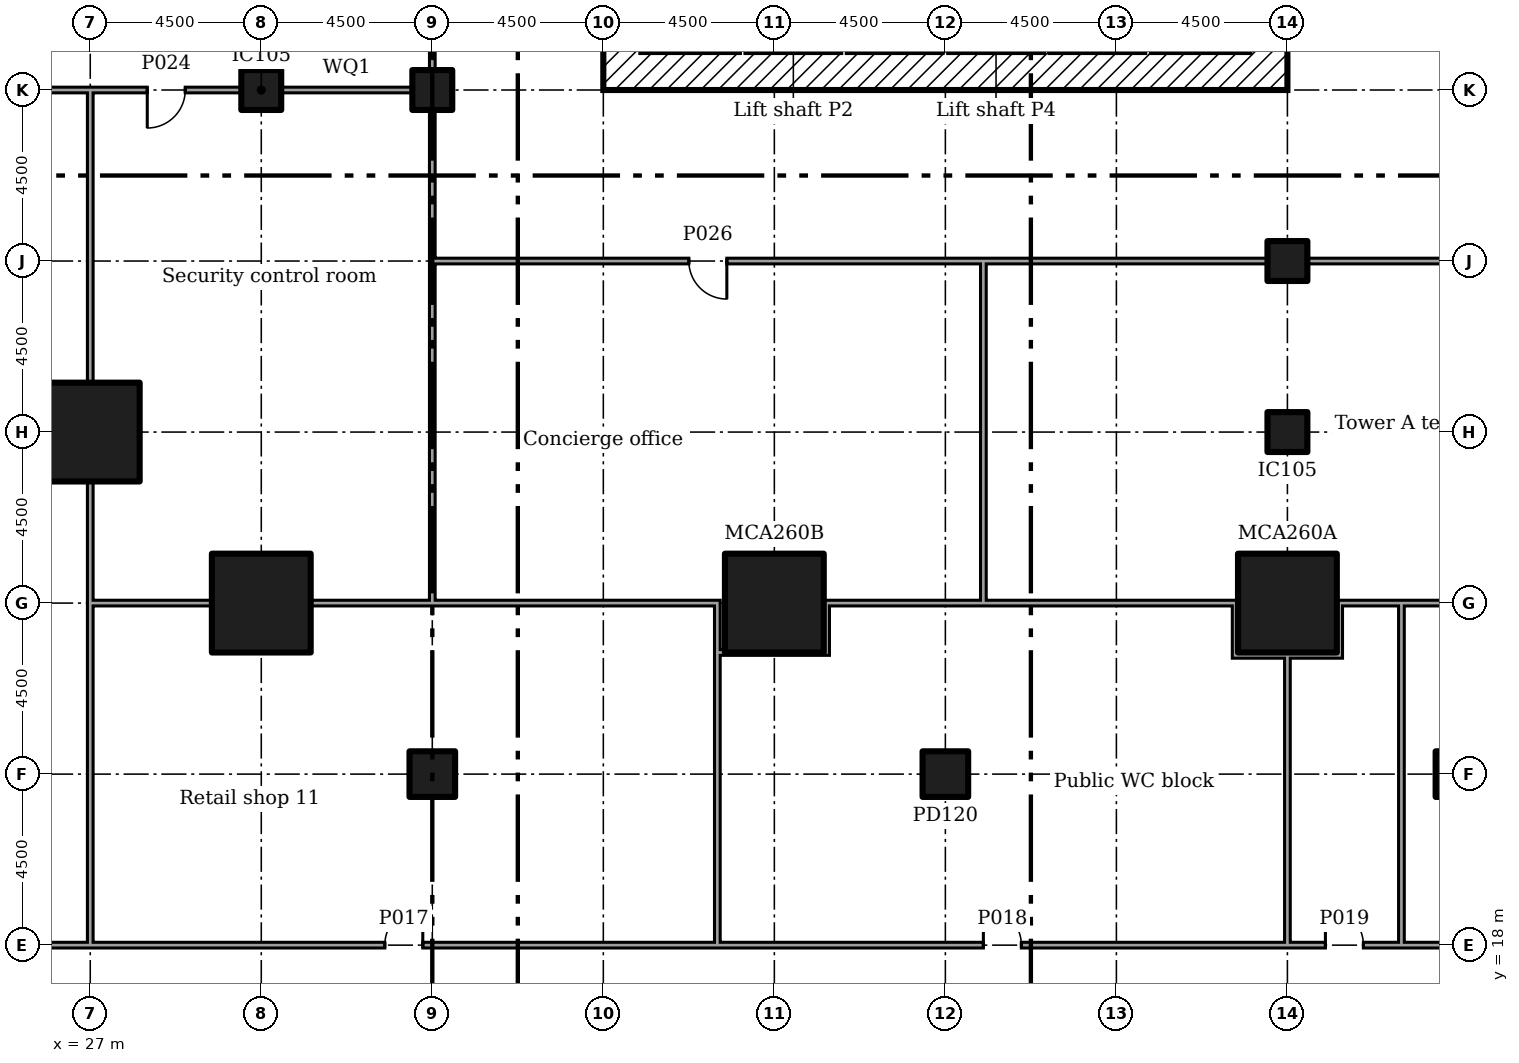
"""IFC4 building model, lengths in metres.
Left out: names, types, materials, properties, quantities, classifications, styles, units other than length and angle.
Written with IfcOpenShell. Run it as: python <this file> out.ifc"""

import sys

from ifc_helpers import new_model, si_unit, direction, frame, frame_2d, origin, origin_2d, place, context, subcontext, project, spatial, rectangle, extrude, element, fill, save


model = new_model("IFC4")
c1 = context("Model", 3, precision=1e-05, world=origin(), true_north=direction((0.0, 1.0)))
c2 = subcontext(c1, "Body", "Model", "MODEL_VIEW")
j1 = project(units=[si_unit("LENGTHUNIT", "METRE"), si_unit("PLANEANGLEUNIT", "RADIAN")], contexts=[c1])
p1 = place(None, origin())
s1 = spatial("IfcSite", under=j1, at=p1, CompositionType="ELEMENT")
p2 = place(p1, origin())
s2 = spatial("IfcBuilding", under=s1, at=p2, CompositionType="ELEMENT")
p3 = place(p2, origin())
s3 = spatial("IfcBuildingStorey", under=s2, at=p3, CompositionType="ELEMENT", Elevation=0.0)
for number, where in (
    (1, (27.0, 31.5, 0.0)),
    (2, (31.5, 27.0, 0.0)),
    (3, (45.0, 27.0, 0.0)),
    (4, (58.5, 27.0, 0.0)),
):
    element("IfcColumn", number, at=place(p3, frame(where)), inside=s3, PredefinedType="COLUMN", context=c2, shape_type="SweptSolid", body=[
        extrude(rectangle(XDim=2.6, YDim=2.6, at=origin_2d()), origin(), (0.0, 0.0, 1.0), 6.0),
    ])
for number, where in (
    (5, (31.5, 40.5, 0.0)),
    (6, (36.0, 40.5, 0.0)),
    (7, (58.5, 31.5, 0.0)),
    (8, (58.5, 36.0, 0.0)),
):
    element("IfcColumn", number, at=place(p3, frame(where)), inside=s3, PredefinedType="COLUMN", context=c2, shape_type="SweptSolid", body=[
        extrude(rectangle(XDim=1.05, YDim=1.05, at=origin_2d()), origin(), (0.0, 0.0, 1.0), 6.0),
    ])
for number, where in (
    (9, (36.0, 22.5, 0.0)),
    (10, (49.5, 22.5, 0.0)),
    (11, (63.0, 22.5, 0.0)),
):
    element("IfcColumn", number, at=place(p3, frame(where)), inside=s3, PredefinedType="COLUMN", context=c2, shape_type="SweptSolid", body=[
        extrude(rectangle(XDim=1.2, YDim=1.2, at=origin_2d()), origin(), (0.0, 0.0, 1.0), 6.0),
    ])
p4 = place(p3, frame((58.0, 40.5, 0.0), z_axis=(0.0, 0.0, 1.0), x_axis=(0.0, 1.0, 0.0)))
e12 = element("IfcWall", 12, at=p4, inside=s3, PredefinedType="SHEAR", context=c2, shape_type="SweptSolid", body=[
    extrude(rectangle(XDim=18.0, YDim=1.0, at=frame_2d((9.0, 0.0))), origin(), (0.0, 0.0, 1.0), 5.5),
])
p5 = place(p4, frame((13.15, 0.0, 0.0)))
e13 = element("IfcOpeningElement", 13, at=p5, cuts=e12, PredefinedType="OPENING", context=c2, shape_type="SweptSolid", body=[
    extrude(rectangle(XDim=1.2, YDim=2.1, at=frame_2d((0.6, 1.05))), frame((0.0, 0.51, 0.0), z_axis=(0.0, -1.0, 0.0), x_axis=(1.0, 0.0, 0.0)), (0.0, 0.0, 1.0), 1.02),
])
p6 = place(p4, frame((3.9, 0.0, 0.0)))
e14 = element("IfcOpeningElement", 14, at=p6, cuts=e12, PredefinedType="OPENING", context=c2, shape_type="SweptSolid", body=[
    extrude(rectangle(XDim=1.8, YDim=2.1, at=frame_2d((0.9, 1.05))), frame((0.0, 0.51, 0.0), z_axis=(0.0, -1.0, 0.0), x_axis=(1.0, 0.0, 0.0)), (0.0, 0.0, 1.0), 1.02),
])
p7 = place(p4, frame((11.525, 0.0, 0.0)))
e15 = element("IfcOpeningElement", 15, at=p7, cuts=e12, PredefinedType="OPENING", context=c2, shape_type="SweptSolid", body=[
    extrude(rectangle(XDim=1.0, YDim=2.1, at=frame_2d((0.5, 1.05))), frame((0.0, 0.51, 0.0), z_axis=(0.0, -1.0, 0.0), x_axis=(1.0, 0.0, 0.0)), (0.0, 0.0, 1.0), 1.02),
])
p8 = place(p3, frame((41.5, 41.0, 0.0)))
e16 = element("IfcWall", 16, at=p8, inside=s3, PredefinedType="SHEAR", context=c2, shape_type="SweptSolid", body=[
    extrude(rectangle(XDim=16.0, YDim=1.0, at=frame_2d((8.0, 0.0))), origin(), (0.0, 0.0, 1.0), 5.5),
])
p9 = place(p3, frame((41.0, 40.5, 0.0), z_axis=(0.0, 0.0, 1.0), x_axis=(0.0, 1.0, 0.0)))
e17 = element("IfcWall", 17, at=p9, inside=s3, PredefinedType="SHEAR", context=c2, shape_type="SweptSolid", body=[
    extrude(rectangle(XDim=18.0, YDim=1.0, at=frame_2d((9.0, 0.0))), origin(), (0.0, 0.0, 1.0), 5.5),
])
p10 = place(p9, frame((3.65, 0.0, 0.0)))
e18 = element("IfcOpeningElement", 18, at=p10, cuts=e17, PredefinedType="OPENING", context=c2, shape_type="SweptSolid", body=[
    extrude(rectangle(XDim=1.2, YDim=2.1, at=frame_2d((0.6, 1.05))), frame((0.0, 0.51, 0.0), z_axis=(0.0, -1.0, 0.0), x_axis=(1.0, 0.0, 0.0)), (0.0, 0.0, 1.0), 1.02),
])
p11 = place(p9, frame((5.475, 0.0, 0.0)))
e19 = element("IfcOpeningElement", 19, at=p11, cuts=e17, PredefinedType="OPENING", context=c2, shape_type="SweptSolid", body=[
    extrude(rectangle(XDim=1.0, YDim=2.1, at=frame_2d((0.5, 1.05))), frame((0.0, 0.51, 0.0), z_axis=(0.0, -1.0, 0.0), x_axis=(1.0, 0.0, 0.0)), (0.0, 0.0, 1.0), 1.02),
])
p12 = place(p9, frame((12.3, 0.0, 0.0)))
e20 = element("IfcOpeningElement", 20, at=p12, cuts=e17, PredefinedType="OPENING", context=c2, shape_type="SweptSolid", body=[
    extrude(rectangle(XDim=1.0, YDim=2.1, at=frame_2d((0.5, 1.05))), frame((0.0, 0.51, 0.0), z_axis=(0.0, -1.0, 0.0), x_axis=(1.0, 0.0, 0.0)), (0.0, 0.0, 1.0), 1.02),
])
for number, where, z_axis, x_axis in (
    (21, (44.167, 41.5, 0.0), (0.0, 0.0, 1.0), (0.0, 1.0, 0.0)),
    (22, (46.833, 41.5, 0.0), (0.0, 0.0, 1.0), (0.0, 1.0, 0.0)),
    (23, (49.5, 41.5, 0.0), (0.0, 0.0, 1.0), (0.0, 1.0, 0.0)),
    (24, (52.167, 41.5, 0.0), (0.0, 0.0, 1.0), (0.0, 1.0, 0.0)),
    (25, (54.833, 41.5, 0.0), (0.0, 0.0, 1.0), (0.0, 1.0, 0.0)),
):
    element("IfcWall", number, at=place(p3, frame(where, z_axis=z_axis, x_axis=x_axis)), inside=s3, PredefinedType="SHEAR", context=c2, shape_type="SweptSolid", body=[
        extrude(rectangle(XDim=2.3, YDim=0.2, at=frame_2d((1.15, 0.0))), origin(), (0.0, 0.0, 1.0), 5.5),
    ])
p13 = place(p3, frame((18.075, 18.0, 0.0)))
e26 = element("IfcWall", 26, at=p13, inside=s3, PredefinedType="PARTITIONING", context=c2, shape_type="SweptSolid", body=[
    extrude(rectangle(XDim=9.0, YDim=0.15, at=frame_2d((4.5, 0.0))), origin(), (0.0, 0.0, 1.0), 5.55),
])
p14 = place(p3, frame((27.0, 18.0, 0.0)))
e27 = element("IfcWall", 27, at=p14, inside=s3, PredefinedType="PARTITIONING", context=c2, shape_type="SweptSolid", body=[
    extrude(rectangle(XDim=16.575, YDim=0.15, at=frame_2d((8.288, 0.0))), origin(), (0.0, 0.0, 1.0), 5.55),
])
p15 = place(p14, frame((7.75, 0.0, 0.0)))
e28 = element("IfcOpeningElement", 28, at=p15, cuts=e27, PredefinedType="OPENING", context=c2, shape_type="SweptSolid", body=[
    extrude(rectangle(XDim=1.0, YDim=2.1, at=frame_2d((0.5, 1.05))), frame((0.0, 0.085, 0.0), z_axis=(0.0, -1.0, 0.0), x_axis=(1.0, 0.0, 0.0)), (0.0, 0.0, 1.0), 0.17),
])
p16 = place(p3, frame((43.5, 18.0, 0.0)))
e29 = element("IfcWall", 29, at=p16, inside=s3, PredefinedType="PARTITIONING", context=c2, shape_type="SweptSolid", body=[
    extrude(rectangle(XDim=15.075, YDim=0.15, at=frame_2d((7.538, 0.0))), origin(), (0.0, 0.0, 1.0), 5.55),
])
p17 = place(p16, frame((7.0, 0.0, 0.0)))
e30 = element("IfcOpeningElement", 30, at=p17, cuts=e29, PredefinedType="OPENING", context=c2, shape_type="SweptSolid", body=[
    extrude(rectangle(XDim=1.0, YDim=2.1, at=frame_2d((0.5, 1.05))), frame((0.0, 0.085, 0.0), z_axis=(0.0, -1.0, 0.0), x_axis=(1.0, 0.0, 0.0)), (0.0, 0.0, 1.0), 0.17),
])
p18 = place(p3, frame((58.5, 18.0, 0.0)))
e31 = element("IfcWall", 31, at=p18, inside=s3, PredefinedType="PARTITIONING", context=c2, shape_type="SweptSolid", body=[
    extrude(rectangle(XDim=3.075, YDim=0.15, at=frame_2d((1.538, 0.0))), origin(), (0.0, 0.0, 1.0), 5.55),
])
p19 = place(p18, frame((1.0, 0.0, 0.0)))
e32 = element("IfcOpeningElement", 32, at=p19, cuts=e31, PredefinedType="OPENING", context=c2, shape_type="SweptSolid", body=[
    extrude(rectangle(XDim=1.0, YDim=2.1, at=frame_2d((0.5, 1.05))), frame((0.0, 0.085, 0.0), z_axis=(0.0, -1.0, 0.0), x_axis=(1.0, 0.0, 0.0)), (0.0, 0.0, 1.0), 0.17),
])
p20 = place(p3, frame((61.5, 18.0, 0.0)))
e33 = element("IfcWall", 33, at=p20, inside=s3, PredefinedType="PARTITIONING", context=c2, shape_type="SweptSolid", body=[
    extrude(rectangle(XDim=10.425, YDim=0.15, at=frame_2d((5.212, 0.0))), origin(), (0.0, 0.0, 1.0), 5.55),
])
p21 = place(p20, frame((4.75, 0.0, 0.0)))
e34 = element("IfcOpeningElement", 34, at=p21, cuts=e33, PredefinedType="OPENING", context=c2, shape_type="SweptSolid", body=[
    extrude(rectangle(XDim=1.0, YDim=2.1, at=frame_2d((0.5, 1.05))), frame((0.0, 0.085, 0.0), z_axis=(0.0, -1.0, 0.0), x_axis=(1.0, 0.0, 0.0)), (0.0, 0.0, 1.0), 0.17),
])
p22 = place(p3, frame((18.075, 40.5, 0.0)))
e35 = element("IfcWall", 35, at=p22, inside=s3, PredefinedType="PARTITIONING", context=c2, shape_type="SweptSolid", body=[
    extrude(rectangle(XDim=9.0, YDim=0.15, at=frame_2d((4.5, 0.0))), origin(), (0.0, 0.0, 1.0), 5.55),
])
p23 = place(p3, frame((27.0, 18.075, 0.0), z_axis=(0.0, 0.0, 1.0), x_axis=(0.0, 1.0, 0.0)))
e36 = element("IfcWall", 36, at=p23, inside=s3, PredefinedType="PARTITIONING", context=c2, shape_type="SweptSolid", body=[
    extrude(rectangle(XDim=9.0, YDim=0.15, at=frame_2d((4.5, 0.0))), origin(), (0.0, 0.0, 1.0), 5.55),
])
p24 = place(p3, frame((27.0, 27.0, 0.0), z_axis=(0.0, 0.0, 1.0), x_axis=(0.0, 1.0, 0.0)))
e37 = element("IfcWall", 37, at=p24, inside=s3, PredefinedType="PARTITIONING", context=c2, shape_type="SweptSolid", body=[
    extrude(rectangle(XDim=3.205, YDim=0.15, at=frame_2d((1.603, 0.0))), origin(), (0.0, 0.0, 1.0), 5.55),
])
p25 = place(p3, frame((27.0, 32.795, 0.0), z_axis=(0.0, 0.0, 1.0), x_axis=(0.0, 1.0, 0.0)))
e38 = element("IfcWall", 38, at=p25, inside=s3, PredefinedType="PARTITIONING", context=c2, shape_type="SweptSolid", body=[
    extrude(rectangle(XDim=7.63, YDim=0.15, at=frame_2d((3.815, 0.0))), origin(), (0.0, 0.0, 1.0), 5.55),
])
p26 = place(p3, frame((27.0, 40.5, 0.0)))
e39 = element("IfcWall", 39, at=p26, inside=s3, PredefinedType="PARTITIONING", context=c2, shape_type="SweptSolid", body=[
    extrude(rectangle(XDim=3.98, YDim=0.15, at=frame_2d((1.99, 0.0))), origin(), (0.0, 0.0, 1.0), 5.55),
])
p27 = place(p26, frame((1.5, 0.0, 0.0)))
e40 = element("IfcOpeningElement", 40, at=p27, cuts=e39, PredefinedType="OPENING", context=c2, shape_type="SweptSolid", body=[
    extrude(rectangle(XDim=1.0, YDim=2.1, at=frame_2d((0.5, 1.05))), frame((0.0, 0.085, 0.0), z_axis=(0.0, -1.0, 0.0), x_axis=(1.0, 0.0, 0.0)), (0.0, 0.0, 1.0), 0.17),
])
p28 = place(p3, frame((32.02, 40.5, 0.0)))
e41 = element("IfcWall", 41, at=p28, inside=s3, PredefinedType="PARTITIONING", context=c2, shape_type="SweptSolid", body=[
    extrude(rectangle(XDim=3.46, YDim=0.15, at=frame_2d((1.73, 0.0))), origin(), (0.0, 0.0, 1.0), 5.55),
])
p29 = place(p3, frame((36.0, 41.02, 0.0), z_axis=(0.0, 0.0, 1.0), x_axis=(0.0, 1.0, 0.0)))
e42 = element("IfcWall", 42, at=p29, inside=s3, PredefinedType="PARTITIONING", context=c2, shape_type="SweptSolid", body=[
    extrude(rectangle(XDim=3.905, YDim=0.15, at=frame_2d((1.953, 0.0))), origin(), (0.0, 0.0, 1.0), 5.55),
])
p30 = place(p29, frame((1.4, 0.0, 0.0)))
e43 = element("IfcOpeningElement", 43, at=p30, cuts=e42, PredefinedType="OPENING", context=c2, shape_type="SweptSolid", body=[
    extrude(rectangle(XDim=1.2, YDim=2.1, at=frame_2d((0.6, 1.05))), frame((0.0, 0.085, 0.0), z_axis=(0.0, -1.0, 0.0), x_axis=(1.0, 0.0, 0.0)), (0.0, 0.0, 1.0), 0.17),
])
p31 = place(p3, frame((43.5, 18.075, 0.0), z_axis=(0.0, 0.0, 1.0), x_axis=(0.0, 1.0, 0.0)))
e44 = element("IfcWall", 44, at=p31, inside=s3, PredefinedType="PARTITIONING", context=c2, shape_type="SweptSolid", body=[
    extrude(rectangle(XDim=7.7, YDim=0.15, at=frame_2d((3.85, 0.0))), origin(), (0.0, 0.0, 1.0), 5.55),
])
p32 = place(p3, frame((27.075, 27.0, 0.0)))
e45 = element("IfcWall", 45, at=p32, inside=s3, PredefinedType="PARTITIONING", context=c2, shape_type="SweptSolid", body=[
    extrude(rectangle(XDim=3.13, YDim=0.15, at=frame_2d((1.565, 0.0))), origin(), (0.0, 0.0, 1.0), 5.55),
])
p33 = place(p3, frame((32.795, 27.0, 0.0)))
e46 = element("IfcWall", 46, at=p33, inside=s3, PredefinedType="PARTITIONING", context=c2, shape_type="SweptSolid", body=[
    extrude(rectangle(XDim=3.28, YDim=0.15, at=frame_2d((1.64, 0.0))), origin(), (0.0, 0.0, 1.0), 5.55),
])
p34 = place(p3, frame((43.5, 25.7, 0.0), z_axis=(0.0, 0.0, 1.0), x_axis=(0.0, 1.0, 0.0)))
e47 = element("IfcWall", 47, at=p34, inside=s3, PredefinedType="PARTITIONING", context=c2, shape_type="SweptSolid", body=[
    extrude(rectangle(XDim=1.375, YDim=0.15, at=frame_2d((0.688, 0.0))), origin(), (0.0, 0.0, 1.0), 5.55),
])
p35 = place(p3, frame((36.0, 27.0, 0.0)))
e48 = element("IfcWall", 48, at=p35, inside=s3, PredefinedType="PARTITIONING", context=c2, shape_type="SweptSolid", body=[
    extrude(rectangle(XDim=7.425, YDim=0.15, at=frame_2d((3.712, 0.0))), origin(), (0.0, 0.0, 1.0), 5.55),
])
p36 = place(p3, frame((58.5, 18.075, 0.0), z_axis=(0.0, 0.0, 1.0), x_axis=(0.0, 1.0, 0.0)))
e49 = element("IfcWall", 49, at=p36, inside=s3, PredefinedType="PARTITIONING", context=c2, shape_type="SweptSolid", body=[
    extrude(rectangle(XDim=7.625, YDim=0.15, at=frame_2d((3.812, 0.0))), origin(), (0.0, 0.0, 1.0), 5.55),
])
p37 = place(p3, frame((46.375, 25.625, 0.0), z_axis=(0.0, 0.0, 1.0), x_axis=(0.0, 1.0, 0.0)))
e50 = element("IfcWall", 50, at=p37, inside=s3, PredefinedType="PARTITIONING", context=c2, shape_type="SweptSolid", body=[
    extrude(rectangle(XDim=1.45, YDim=0.15, at=frame_2d((0.725, 0.0))), origin(), (0.0, 0.0, 1.0), 5.55),
])
p38 = place(p3, frame((43.575, 25.7, 0.0)))
e51 = element("IfcWall", 51, at=p38, inside=s3, PredefinedType="PARTITIONING", context=c2, shape_type="SweptSolid", body=[
    extrude(rectangle(XDim=2.725, YDim=0.15, at=frame_2d((1.363, 0.0))), origin(), (0.0, 0.0, 1.0), 5.55),
])
p39 = place(p3, frame((46.45, 27.0, 0.0)))
e52 = element("IfcWall", 52, at=p39, inside=s3, PredefinedType="PARTITIONING", context=c2, shape_type="SweptSolid", body=[
    extrude(rectangle(XDim=4.125, YDim=0.15, at=frame_2d((2.062, 0.0))), origin(), (0.0, 0.0, 1.0), 5.55),
])
p40 = place(p3, frame((57.125, 25.55, 0.0), z_axis=(0.0, 0.0, 1.0), x_axis=(0.0, 1.0, 0.0)))
e53 = element("IfcWall", 53, at=p40, inside=s3, PredefinedType="PARTITIONING", context=c2, shape_type="SweptSolid", body=[
    extrude(rectangle(XDim=1.525, YDim=0.15, at=frame_2d((0.762, 0.0))), origin(), (0.0, 0.0, 1.0), 5.55),
])
p41 = place(p3, frame((57.2, 25.625, 0.0)))
e54 = element("IfcWall", 54, at=p41, inside=s3, PredefinedType="PARTITIONING", context=c2, shape_type="SweptSolid", body=[
    extrude(rectangle(XDim=1.225, YDim=0.15, at=frame_2d((0.613, 0.0))), origin(), (0.0, 0.0, 1.0), 5.55),
])
p42 = place(p3, frame((50.5, 27.0, 0.0)))
e55 = element("IfcWall", 55, at=p42, inside=s3, PredefinedType="PARTITIONING", context=c2, shape_type="SweptSolid", body=[
    extrude(rectangle(XDim=6.55, YDim=0.15, at=frame_2d((3.275, 0.0))), origin(), (0.0, 0.0, 1.0), 5.55),
])
p43 = place(p3, frame((61.5, 18.075, 0.0), z_axis=(0.0, 0.0, 1.0), x_axis=(0.0, 1.0, 0.0)))
e56 = element("IfcWall", 56, at=p43, inside=s3, PredefinedType="PARTITIONING", context=c2, shape_type="SweptSolid", body=[
    extrude(rectangle(XDim=9.0, YDim=0.15, at=frame_2d((4.5, 0.0))), origin(), (0.0, 0.0, 1.0), 5.55),
])
p44 = place(p3, frame((59.875, 25.55, 0.0), z_axis=(0.0, 0.0, 1.0), x_axis=(0.0, 1.0, 0.0)))
e57 = element("IfcWall", 57, at=p44, inside=s3, PredefinedType="PARTITIONING", context=c2, shape_type="SweptSolid", body=[
    extrude(rectangle(XDim=1.525, YDim=0.15, at=frame_2d((0.762, 0.0))), origin(), (0.0, 0.0, 1.0), 5.55),
])
p45 = place(p3, frame((58.425, 25.625, 0.0)))
e58 = element("IfcWall", 58, at=p45, inside=s3, PredefinedType="PARTITIONING", context=c2, shape_type="SweptSolid", body=[
    extrude(rectangle(XDim=1.375, YDim=0.15, at=frame_2d((0.688, 0.0))), origin(), (0.0, 0.0, 1.0), 5.55),
])
p46 = place(p3, frame((59.95, 27.0, 0.0)))
e59 = element("IfcWall", 59, at=p46, inside=s3, PredefinedType="PARTITIONING", context=c2, shape_type="SweptSolid", body=[
    extrude(rectangle(XDim=1.55, YDim=0.15, at=frame_2d((0.775, 0.0))), origin(), (0.0, 0.0, 1.0), 5.55),
])
p47 = place(p3, frame((61.575, 27.0, 0.0)))
e60 = element("IfcWall", 60, at=p47, inside=s3, PredefinedType="PARTITIONING", context=c2, shape_type="SweptSolid", body=[
    extrude(rectangle(XDim=4.63, YDim=0.15, at=frame_2d((2.315, 0.0))), origin(), (0.0, 0.0, 1.0), 5.55),
])
p48 = place(p3, frame((36.0, 27.075, 0.0), z_axis=(0.0, 0.0, 1.0), x_axis=(0.0, 1.0, 0.0)))
e61 = element("IfcWall", 61, at=p48, inside=s3, PredefinedType="PARTITIONING", context=c2, shape_type="SweptSolid", body=[
    extrude(rectangle(XDim=9.0, YDim=0.15, at=frame_2d((4.5, 0.0))), origin(), (0.0, 0.0, 1.0), 5.55),
])
p49 = place(p3, frame((36.0, 36.0, 0.0), z_axis=(0.0, 0.0, 1.0), x_axis=(0.0, 1.0, 0.0)))
e62 = element("IfcWall", 62, at=p49, inside=s3, PredefinedType="PARTITIONING", context=c2, shape_type="SweptSolid", body=[
    extrude(rectangle(XDim=3.98, YDim=0.15, at=frame_2d((1.99, 0.0))), origin(), (0.0, 0.0, 1.0), 5.55),
])
p50 = place(p3, frame((50.5, 27.075, 0.0), z_axis=(0.0, 0.0, 1.0), x_axis=(0.0, 1.0, 0.0)))
e63 = element("IfcWall", 63, at=p50, inside=s3, PredefinedType="PARTITIONING", context=c2, shape_type="SweptSolid", body=[
    extrude(rectangle(XDim=9.0, YDim=0.15, at=frame_2d((4.5, 0.0))), origin(), (0.0, 0.0, 1.0), 5.55),
])
p51 = place(p3, frame((36.075, 36.0, 0.0)))
e64 = element("IfcWall", 64, at=p51, inside=s3, PredefinedType="PARTITIONING", context=c2, shape_type="SweptSolid", body=[
    extrude(rectangle(XDim=14.425, YDim=0.15, at=frame_2d((7.212, 0.0))), origin(), (0.0, 0.0, 1.0), 5.55),
])
p52 = place(p51, frame((6.675, 0.0, 0.0)))
e65 = element("IfcOpeningElement", 65, at=p52, cuts=e64, PredefinedType="OPENING", context=c2, shape_type="SweptSolid", body=[
    extrude(rectangle(XDim=1.0, YDim=2.1, at=frame_2d((0.5, 1.05))), frame((0.0, 0.085, 0.0), z_axis=(0.0, -1.0, 0.0), x_axis=(1.0, 0.0, 0.0)), (0.0, 0.0, 1.0), 0.17),
])
p53 = place(p3, frame((50.575, 36.0, 0.0)))
e66 = element("IfcWall", 66, at=p53, inside=s3, PredefinedType="PARTITIONING", context=c2, shape_type="SweptSolid", body=[
    extrude(rectangle(XDim=7.405, YDim=0.15, at=frame_2d((3.703, 0.0))), origin(), (0.0, 0.0, 1.0), 5.55),
])
p54 = place(p3, frame((59.02, 36.0, 0.0)))
e67 = element("IfcWall", 67, at=p54, inside=s3, PredefinedType="PARTITIONING", context=c2, shape_type="SweptSolid", body=[
    extrude(rectangle(XDim=3.98, YDim=0.15, at=frame_2d((1.99, 0.0))), origin(), (0.0, 0.0, 1.0), 5.55),
])
p55 = place(p15, origin())
e68 = element("IfcDoor", 68, at=p55, inside=s3, OperationType="SINGLE_SWING_LEFT", PredefinedType="DOOR", context=c2, shape_type="SweptSolid", body=[
    extrude(rectangle(XDim=1.0, YDim=2.1, at=frame_2d((0.5, 1.05))), frame((0.0, 0.025, 0.0), z_axis=(0.0, -1.0, 0.0), x_axis=(1.0, 0.0, 0.0)), (0.0, 0.0, 1.0), 0.05),
])
fill(e28, e68)
p56 = place(p17, origin())
e69 = element("IfcDoor", 69, at=p56, inside=s3, OperationType="SINGLE_SWING_RIGHT", PredefinedType="DOOR", context=c2, shape_type="SweptSolid", body=[
    extrude(rectangle(XDim=1.0, YDim=2.1, at=frame_2d((0.5, 1.05))), frame((0.0, 0.025, 0.0), z_axis=(0.0, -1.0, 0.0), x_axis=(1.0, 0.0, 0.0)), (0.0, 0.0, 1.0), 0.05),
])
fill(e30, e69)
p57 = place(p19, origin())
e70 = element("IfcDoor", 70, at=p57, inside=s3, OperationType="SINGLE_SWING_RIGHT", PredefinedType="DOOR", context=c2, shape_type="SweptSolid", body=[
    extrude(rectangle(XDim=1.0, YDim=2.1, at=frame_2d((0.5, 1.05))), frame((0.0, 0.025, 0.0), z_axis=(0.0, -1.0, 0.0), x_axis=(1.0, 0.0, 0.0)), (0.0, 0.0, 1.0), 0.05),
])
fill(e32, e70)
p58 = place(p27, frame((1.0, 0.0, 0.0), x_axis=(-1.0, 0.0, 0.0)))
e71 = element("IfcDoor", 71, at=p58, inside=s3, OperationType="SINGLE_SWING_LEFT", PredefinedType="DOOR", context=c2, shape_type="SweptSolid", body=[
    extrude(rectangle(XDim=1.0, YDim=2.1, at=frame_2d((0.5, 1.05))), frame((0.0, 0.025, 0.0), z_axis=(0.0, -1.0, 0.0), x_axis=(1.0, 0.0, 0.0)), (0.0, 0.0, 1.0), 0.05),
])
fill(e40, e71)
p59 = place(p52, frame((1.0, 0.0, 0.0), x_axis=(-1.0, 0.0, 0.0)))
e72 = element("IfcDoor", 72, at=p59, inside=s3, OperationType="SINGLE_SWING_RIGHT", PredefinedType="DOOR", context=c2, shape_type="SweptSolid", body=[
    extrude(rectangle(XDim=1.0, YDim=2.1, at=frame_2d((0.5, 1.05))), frame((0.0, 0.025, 0.0), z_axis=(0.0, -1.0, 0.0), x_axis=(1.0, 0.0, 0.0)), (0.0, 0.0, 1.0), 0.05),
])
fill(e65, e72)
save(model, sys.argv[1])
